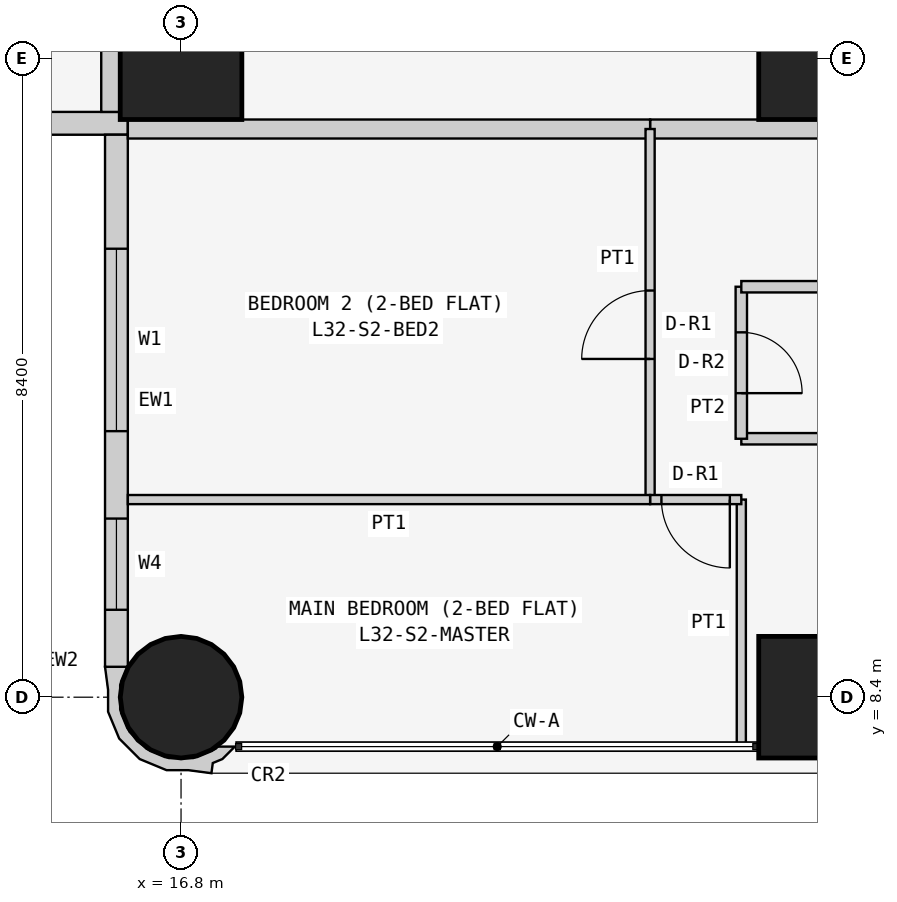
"""IFC4 building model, lengths in metres.
Left out: names, types, materials, properties, quantities, classifications, styles, units other than length and angle.
Written with IfcOpenShell. Run it as: python <this file> out.ifc"""

import sys

from ifc_helpers import new_model, si_unit, direction, frame, frame_2d, origin, origin_2d, place, context, subcontext, project, spatial, polyline, rectangle, circle, outline, extrude, element, fill, save


model = new_model("IFC4")
c1 = context("Model", 3, precision=1e-05, world=origin(), true_north=direction((0.0, 1.0)))
c2 = subcontext(c1, "Body", "Model", "MODEL_VIEW")
j1 = project(units=[si_unit("LENGTHUNIT", "METRE"), si_unit("PLANEANGLEUNIT", "RADIAN")], contexts=[c1])
p1 = place(None, origin())
s1 = spatial("IfcSite", under=j1, at=p1, CompositionType="ELEMENT")
p2 = place(p1, origin())
s2 = spatial("IfcBuilding", under=s1, at=p2, CompositionType="ELEMENT")
p3 = place(p2, frame((0.0, 0.0, 126.9)))
s3 = spatial("IfcBuildingStorey", under=s2, at=p3, CompositionType="ELEMENT", Elevation=126.9)
p4 = place(p3, frame((16.8, 8.4, 0.0), z_axis=(0.0, 0.0, 1.0), x_axis=(1.0, 0.0, 0.0)))
e1 = element("IfcColumn", 1, at=p4, inside=s3, PredefinedType="COLUMN", context=c2, shape_type="SweptSolid", body=[
    extrude(circle(Radius=0.8, at=origin_2d()), origin(), (0.0, 0.0, 1.0), 3.6),
])
for number, where, z_axis, x_axis in (
    (2, (16.8, 16.8, 0.0), (0.0, 0.0, 1.0), (1.0, 0.0, 0.0)),
    (3, (25.2, 8.4, 0.0), (0.0, 0.0, 1.0), (1.0, 0.0, 0.0)),
    (4, (25.2, 16.8, 0.0), (0.0, 0.0, 1.0), (1.0, 0.0, 0.0)),
):
    element("IfcColumn", number, at=place(p3, frame(where, z_axis=z_axis, x_axis=x_axis)), inside=s3, PredefinedType="COLUMN", context=c2, shape_type="SweptSolid", body=[
        extrude(rectangle(XDim=1.6, YDim=1.6, at=origin_2d()), origin(), (0.0, 0.0, 1.0), 3.6),
    ])
p5 = place(p3, frame((0.4, 15.95, 0.0), z_axis=(0.0, 0.0, 1.0), x_axis=(1.0, 0.0, 0.0)))
e5 = element("IfcWall", 5, at=p5, inside=s3, PredefinedType="SOLIDWALL", context=c2, shape_type="SweptSolid", body=[
    extrude(rectangle(XDim=15.7, YDim=0.3, at=frame_2d((7.85, 0.0))), origin(), (0.0, 0.0, 1.0), 3.45),
])
p6 = place(p5, frame((12.4, 0.0, 0.9)))
e6 = element("IfcOpeningElement", 6, at=p6, cuts=e5, PredefinedType="OPENING", context=c2, shape_type="SweptSolid", body=[
    extrude(rectangle(XDim=1.8, YDim=1.5, at=frame_2d((0.9, 0.75))), frame((0.0, 0.16, 0.0), z_axis=(0.0, -1.0, 0.0), x_axis=(1.0, 0.0, 0.0)), (0.0, 0.0, 1.0), 0.32),
])
p7 = place(p5, frame((9.55, 0.0, 1.5)))
e7 = element("IfcOpeningElement", 7, at=p7, cuts=e5, PredefinedType="OPENING", context=c2, shape_type="SweptSolid", body=[
    extrude(rectangle(XDim=0.9, YDim=0.7, at=frame_2d((0.45, 0.35))), frame((0.0, 0.16, 0.0), z_axis=(0.0, -1.0, 0.0), x_axis=(1.0, 0.0, 0.0)), (0.0, 0.0, 1.0), 0.32),
])
p8 = place(p5, frame((5.1, 0.0, 0.9)))
e8 = element("IfcOpeningElement", 8, at=p8, cuts=e5, PredefinedType="OPENING", context=c2, shape_type="SweptSolid", body=[
    extrude(rectangle(XDim=1.8, YDim=1.5, at=frame_2d((0.9, 0.75))), frame((0.0, 0.16, 0.0), z_axis=(0.0, -1.0, 0.0), x_axis=(1.0, 0.0, 0.0)), (0.0, 0.0, 1.0), 0.32),
])
p9 = place(p5, frame((2.0, 0.0, 0.0)))
e9 = element("IfcOpeningElement", 9, at=p9, cuts=e5, PredefinedType="OPENING", context=c2, shape_type="SweptSolid", body=[
    extrude(rectangle(XDim=0.9, YDim=2.4, at=frame_2d((0.45, 1.2))), frame((0.0, 0.16, 0.0), z_axis=(0.0, -1.0, 0.0), x_axis=(1.0, 0.0, 0.0)), (0.0, 0.0, 1.0), 0.32),
])
p10 = place(p5, frame((0.7, 0.0, 0.9)))
e10 = element("IfcOpeningElement", 10, at=p10, cuts=e5, PredefinedType="OPENING", context=c2, shape_type="SweptSolid", body=[
    extrude(rectangle(XDim=1.2, YDim=1.5, at=frame_2d((0.6, 0.75))), frame((0.0, 0.16, 0.0), z_axis=(0.0, -1.0, 0.0), x_axis=(1.0, 0.0, 0.0)), (0.0, 0.0, 1.0), 0.32),
])
p11 = place(p3, frame((15.95, 15.8, 0.0), z_axis=(0.0, 0.0, 1.0), x_axis=(0.0, -1.0, 0.0)))
e11 = element("IfcWall", 11, at=p11, inside=s3, PredefinedType="SOLIDWALL", context=c2, shape_type="SweptSolid", body=[
    extrude(rectangle(XDim=7.0, YDim=0.3, at=frame_2d((3.5, 0.0))), origin(), (0.0, 0.0, 1.0), 3.45),
])
p12 = place(p11, frame((1.5, 0.0, 0.9)))
e12 = element("IfcOpeningElement", 12, at=p12, cuts=e11, PredefinedType="OPENING", context=c2, shape_type="SweptSolid", body=[
    extrude(rectangle(XDim=2.4, YDim=1.5, at=frame_2d((1.2, 0.75))), frame((0.0, 0.16, 0.0), z_axis=(0.0, -1.0, 0.0), x_axis=(1.0, 0.0, 0.0)), (0.0, 0.0, 1.0), 0.32),
])
p13 = place(p11, frame((5.05, 0.0, 0.9)))
e13 = element("IfcOpeningElement", 13, at=p13, cuts=e11, PredefinedType="OPENING", context=c2, shape_type="SweptSolid", body=[
    extrude(rectangle(XDim=1.2, YDim=1.5, at=frame_2d((0.6, 0.75))), frame((0.0, 0.16, 0.0), z_axis=(0.0, -1.0, 0.0), x_axis=(1.0, 0.0, 0.0)), (0.0, 0.0, 1.0), 0.32),
])
p14 = place(p3, frame((15.983, 8.727, 0.0), z_axis=(0.0, 0.0, 1.0), x_axis=(-0.343276641956, -0.93923434088, 0.0)))
e14 = element("IfcWall", 14, at=p14, inside=s3, PredefinedType="SOLIDWALL", context=c2, shape_type="SweptSolid", body=[
    extrude(outline(polyline([(0.829, 1.599), (0.697, 1.569), (0.604, 1.67), (0.394, 1.767), (0.471, 1.556), (0.509, 1.539), (0.724, 1.304), (0.833, 1.005), (0.82, 0.686), (0.686, 0.397), (0.451, 0.182), (0.152, 0.073), (-0.116, 0.084), (-0.127, 0.078), (-0.146, 0.071), (-0.006, -0.197), (0.266, -0.055), (0.535, 0.044), (0.817, 0.302), (0.978, 0.648), (0.994, 1.03), (0.895, 1.3), (0.829, 1.599)])), origin(), (0.0, 0.0, 1.0), 3.45),
])
p15 = place(p3, frame((29.4, 15.875, 0.0), z_axis=(0.0, 0.0, 1.0), x_axis=(-1.0, 0.0, 0.0)))
e15 = element("IfcWall", 15, at=p15, inside=s3, PredefinedType="PARTITIONING", context=c2, shape_type="SweptSolid", body=[
    extrude(rectangle(XDim=6.429, YDim=0.25, at=frame_2d((3.214, 0.0))), origin(), (0.0, 0.0, 1.0), 3.45),
])
p16 = place(p15, frame((0.5, 0.0, 0.0)))
e16 = element("IfcOpeningElement", 16, at=p16, cuts=e15, PredefinedType="OPENING", context=c2, shape_type="SweptSolid", body=[
    extrude(rectangle(XDim=1.0, YDim=2.1, at=frame_2d((0.5, 1.05))), frame((0.0, 0.135, 0.0), z_axis=(0.0, -1.0, 0.0), x_axis=(1.0, 0.0, 0.0)), (0.0, 0.0, 1.0), 0.27),
])
for number, where, z_axis, x_axis in (
    (17, (22.971, 15.875, 0.0), (0.0, 0.0, 1.0), (-1.0, 0.0, 0.0)),
    (18, (15.875, 16.1, 0.0), (0.0, 0.0, 1.0), (0.0, 1.0, 0.0)),
):
    element("IfcWall", number, at=place(p3, frame(where, z_axis=z_axis, x_axis=x_axis)), inside=s3, PredefinedType="PARTITIONING", context=c2, shape_type="SweptSolid", body=[
        extrude(rectangle(XDim=6.871, YDim=0.25, at=frame_2d((3.436, 0.0))), origin(), (0.0, 0.0, 1.0), 3.45),
    ])
p17 = place(p3, frame((29.4, 11.8, 0.0), z_axis=(0.0, 0.0, 1.0), x_axis=(-1.0, 0.0, 0.0)))
e19 = element("IfcWall", 19, at=p17, inside=s3, PredefinedType="PARTITIONING", context=c2, shape_type="SweptSolid", body=[
    extrude(rectangle(XDim=5.229, YDim=0.15, at=frame_2d((2.615, 0.0))), origin(), (0.0, 0.0, 1.0), 3.45),
])
p18 = place(p3, frame((24.171, 11.8, 0.0), z_axis=(0.0, 0.0, 1.0), x_axis=(0.0, 1.0, 0.0)))
e20 = element("IfcWall", 20, at=p18, inside=s3, PredefinedType="PARTITIONING", context=c2, shape_type="SweptSolid", body=[
    extrude(rectangle(XDim=2.0, YDim=0.15, at=frame_2d((1.0, 0.0))), origin(), (0.0, 0.0, 1.0), 3.45),
])
p19 = place(p18, frame((0.6, 0.0, 0.0)))
e21 = element("IfcOpeningElement", 21, at=p19, cuts=e20, PredefinedType="OPENING", context=c2, shape_type="SweptSolid", body=[
    extrude(rectangle(XDim=0.8, YDim=2.1, at=frame_2d((0.4, 1.05))), frame((0.0, 0.085, 0.0), z_axis=(0.0, -1.0, 0.0), x_axis=(1.0, 0.0, 0.0)), (0.0, 0.0, 1.0), 0.17),
])
p20 = place(p3, frame((24.171, 13.8, 0.0), z_axis=(0.0, 0.0, 1.0), x_axis=(1.0, 0.0, 0.0)))
e22 = element("IfcWall", 22, at=p20, inside=s3, PredefinedType="PARTITIONING", context=c2, shape_type="SweptSolid", body=[
    extrude(rectangle(XDim=5.229, YDim=0.15, at=frame_2d((2.615, 0.0))), origin(), (0.0, 0.0, 1.0), 3.45),
])
p21 = place(p3, frame((22.971, 11.0, 0.0), z_axis=(0.0, 0.0, 1.0), x_axis=(0.0, 1.0, 0.0)))
e23 = element("IfcWall", 23, at=p21, inside=s3, PredefinedType="PARTITIONING", context=c2, shape_type="SweptSolid", body=[
    extrude(rectangle(XDim=4.875, YDim=0.12, at=frame_2d((2.438, 0.0))), origin(), (0.0, 0.0, 1.0), 3.45),
])
p22 = place(p21, frame((1.85, 0.0, 0.0)))
e24 = element("IfcOpeningElement", 24, at=p22, cuts=e23, PredefinedType="OPENING", context=c2, shape_type="SweptSolid", body=[
    extrude(rectangle(XDim=0.9, YDim=2.1, at=frame_2d((0.45, 1.05))), frame((0.0, 0.07, 0.0), z_axis=(0.0, -1.0, 0.0), x_axis=(1.0, 0.0, 0.0)), (0.0, 0.0, 1.0), 0.14),
])
p23 = place(p3, frame((24.171, 7.75, 0.0), z_axis=(0.0, 0.0, 1.0), x_axis=(0.0, 1.0, 0.0)))
e25 = element("IfcWall", 25, at=p23, inside=s3, PredefinedType="PARTITIONING", context=c2, shape_type="SweptSolid", body=[
    extrude(rectangle(XDim=3.25, YDim=0.12, at=frame_2d((1.625, 0.0))), origin(), (0.0, 0.0, 1.0), 3.45),
])
p24 = place(p3, frame((24.171, 11.0, 0.0), z_axis=(0.0, 0.0, 1.0), x_axis=(-1.0, 0.0, 0.0)))
e26 = element("IfcWall", 26, at=p24, inside=s3, PredefinedType="PARTITIONING", context=c2, shape_type="SweptSolid", body=[
    extrude(rectangle(XDim=1.2, YDim=0.12, at=frame_2d((0.6, 0.0))), origin(), (0.0, 0.0, 1.0), 3.45),
])
p25 = place(p24, frame((0.151, 0.0, 0.0)))
e27 = element("IfcOpeningElement", 27, at=p25, cuts=e26, PredefinedType="OPENING", context=c2, shape_type="SweptSolid", body=[
    extrude(rectangle(XDim=0.9, YDim=2.1, at=frame_2d((0.45, 1.05))), frame((0.0, 0.07, 0.0), z_axis=(0.0, -1.0, 0.0), x_axis=(1.0, 0.0, 0.0)), (0.0, 0.0, 1.0), 0.14),
])
p26 = place(p3, frame((22.971, 11.0, 0.0), z_axis=(0.0, 0.0, 1.0), x_axis=(-1.0, 0.0, 0.0)))
e28 = element("IfcWall", 28, at=p26, inside=s3, PredefinedType="PARTITIONING", context=c2, shape_type="SweptSolid", body=[
    extrude(rectangle(XDim=6.871, YDim=0.12, at=frame_2d((3.436, 0.0))), origin(), (0.0, 0.0, 1.0), 3.45),
])
p27 = place(p12, origin())
e29 = element("IfcWindow", 29, at=p27, inside=s3, PartitioningType="SINGLE_PANEL", PredefinedType="WINDOW", context=c2, shape_type="SweptSolid", body=[
    extrude(rectangle(XDim=2.4, YDim=1.5, at=frame_2d((1.2, 0.75))), frame((0.0, 0.03, 0.0), z_axis=(0.0, -1.0, 0.0), x_axis=(1.0, 0.0, 0.0)), (0.0, 0.0, 1.0), 0.06),
])
fill(e12, e29)
p28 = place(p13, origin())
e30 = element("IfcWindow", 30, at=p28, inside=s3, PartitioningType="SINGLE_PANEL", PredefinedType="WINDOW", context=c2, shape_type="SweptSolid", body=[
    extrude(rectangle(XDim=1.2, YDim=1.5, at=frame_2d((0.6, 0.75))), frame((0.0, 0.03, 0.0), z_axis=(0.0, -1.0, 0.0), x_axis=(1.0, 0.0, 0.0)), (0.0, 0.0, 1.0), 0.06),
])
fill(e13, e30)
p29 = place(p19, frame((0.8, 0.0, 0.0), z_axis=(0.0, 0.0, 1.0), x_axis=(-1.0, 0.0, 0.0)))
e31 = element("IfcDoor", 31, at=p29, inside=s3, OperationType="SINGLE_SWING_RIGHT", PredefinedType="DOOR", context=c2, shape_type="SweptSolid", body=[
    extrude(rectangle(XDim=0.8, YDim=2.1, at=frame_2d((0.4, 1.05))), frame((0.0, 0.025, 0.0), z_axis=(0.0, -1.0, 0.0), x_axis=(1.0, 0.0, 0.0)), (0.0, 0.0, 1.0), 0.05),
])
fill(e21, e31)
p30 = place(p22, origin())
e32 = element("IfcDoor", 32, at=p30, inside=s3, OperationType="SINGLE_SWING_LEFT", PredefinedType="DOOR", context=c2, shape_type="SweptSolid", body=[
    extrude(rectangle(XDim=0.9, YDim=2.1, at=frame_2d((0.45, 1.05))), frame((0.0, 0.025, 0.0), z_axis=(0.0, -1.0, 0.0), x_axis=(1.0, 0.0, 0.0)), (0.0, 0.0, 1.0), 0.05),
])
fill(e24, e32)
p31 = place(p25, origin())
e33 = element("IfcDoor", 33, at=p31, inside=s3, OperationType="SINGLE_SWING_LEFT", PredefinedType="DOOR", context=c2, shape_type="SweptSolid", body=[
    extrude(rectangle(XDim=0.9, YDim=2.1, at=frame_2d((0.45, 1.05))), frame((0.0, 0.025, 0.0), z_axis=(0.0, -1.0, 0.0), x_axis=(1.0, 0.0, 0.0)), (0.0, 0.0, 1.0), 0.05),
])
fill(e27, e33)
save(model, sys.argv[1])
